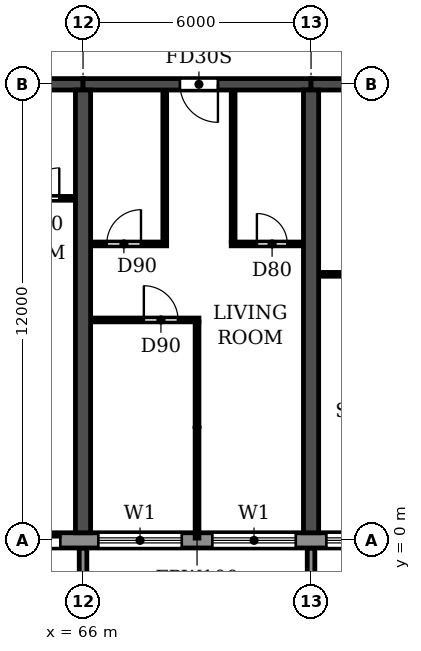
"""IFC4 building model, lengths in metres.
Left out: names, types, materials, properties, quantities, classifications, styles, units other than length and angle.
Written with IfcOpenShell. Run it as: python <this file> out.ifc"""

import sys

from ifc_helpers import new_model, si_unit, direction, frame, frame_2d, origin, place, context, subcontext, project, spatial, polyline, rectangle, outline, extrude, source, transform, mapped, element, fill, save


model = new_model("IFC4")
c1 = context("Model", 3, precision=1e-05, world=origin(), true_north=direction((0.0, 1.0)))
c2 = subcontext(c1, "Body", "Model", "MODEL_VIEW")
j1 = project(units=[si_unit("LENGTHUNIT", "METRE"), si_unit("PLANEANGLEUNIT", "RADIAN")], contexts=[c1])
p1 = place(None, origin())
s1 = spatial("IfcSite", under=j1, at=p1, CompositionType="ELEMENT")
p2 = place(p1, origin())
s2 = spatial("IfcBuilding", under=s1, at=p2, CompositionType="ELEMENT")
p3 = place(p2, frame((0.0, 0.0, 33.3)))
s3 = spatial("IfcBuildingStorey", under=s2, at=p3, CompositionType="ELEMENT", Elevation=33.3)
for number, where, z_axis, x_axis in (
    (1, (66.0, 0.2, 0.0), (0.0, 0.0, 1.0), (0.0, 1.0, 0.0)),
    (2, (72.0, 0.2, 0.0), (0.0, 0.0, 1.0), (0.0, 1.0, 0.0)),
):
    element("IfcWall", number, at=place(p3, frame(where, z_axis=z_axis, x_axis=x_axis)), inside=s3, PredefinedType="SHEAR", context=c2, shape_type="SweptSolid", body=[
        extrude(rectangle(XDim=11.65, YDim=0.4, at=frame_2d((5.825, 0.0))), origin(), (0.0, 0.0, 1.0), 3.05),
    ])
p4 = place(p3, frame((60.0, 12.0, 0.0), z_axis=(0.0, 0.0, 1.0), x_axis=(1.0, 0.0, 0.0)))
e3 = element("IfcWall", 3, at=p4, inside=s3, PredefinedType="SHEAR", context=c2, shape_type="SweptSolid", body=[
    extrude(rectangle(XDim=6.0, YDim=0.3, at=frame_2d((3.0, 0.0))), origin(), (0.0, 0.0, 1.0), 2.45),
])
p5 = place(p4, frame((2.55, 0.0, 0.0)))
e4 = element("IfcOpeningElement", 4, at=p5, cuts=e3, PredefinedType="OPENING", context=c2, shape_type="SweptSolid", body=[
    extrude(rectangle(XDim=1.0, YDim=2.1, at=frame_2d((0.5, 1.05))), frame((0.0, 0.16, 0.0), z_axis=(0.0, -1.0, 0.0), x_axis=(1.0, 0.0, 0.0)), (0.0, 0.0, 1.0), 0.32),
])
p6 = place(p3, frame((66.0, 12.0, 0.0), z_axis=(0.0, 0.0, 1.0), x_axis=(1.0, 0.0, 0.0)))
e5 = element("IfcWall", 5, at=p6, inside=s3, PredefinedType="SHEAR", context=c2, shape_type="SweptSolid", body=[
    extrude(rectangle(XDim=6.0, YDim=0.3, at=frame_2d((3.0, 0.0))), origin(), (0.0, 0.0, 1.0), 2.45),
])
p7 = place(p6, frame((2.55, 0.0, 0.0)))
e6 = element("IfcOpeningElement", 6, at=p7, cuts=e5, PredefinedType="OPENING", context=c2, shape_type="SweptSolid", body=[
    extrude(rectangle(XDim=1.0, YDim=2.1, at=frame_2d((0.5, 1.05))), frame((0.0, 0.16, 0.0), z_axis=(0.0, -1.0, 0.0), x_axis=(1.0, 0.0, 0.0)), (0.0, 0.0, 1.0), 0.32),
])
p8 = place(p3, frame((72.0, 12.0, 0.0), z_axis=(0.0, 0.0, 1.0), x_axis=(1.0, 0.0, 0.0)))
e7 = element("IfcWall", 7, at=p8, inside=s3, PredefinedType="SHEAR", context=c2, shape_type="SweptSolid", body=[
    extrude(rectangle(XDim=6.0, YDim=0.3, at=frame_2d((3.0, 0.0))), origin(), (0.0, 0.0, 1.0), 2.45),
])
p9 = place(p8, frame((2.45, 0.0, 0.0)))
e8 = element("IfcOpeningElement", 8, at=p9, cuts=e7, PredefinedType="OPENING", context=c2, shape_type="SweptSolid", body=[
    extrude(rectangle(XDim=1.0, YDim=2.1, at=frame_2d((0.5, 1.05))), frame((0.0, 0.16, 0.0), z_axis=(0.0, -1.0, 0.0), x_axis=(1.0, 0.0, 0.0)), (0.0, 0.0, 1.0), 0.32),
])
p10 = place(p3, frame((4.683, 0.0, 0.0), z_axis=(0.0, 0.0, 1.0), x_axis=(1.0, 0.0, 0.0)))
e9 = element("IfcWall", 9, at=p10, inside=s3, PredefinedType="STANDARD", context=c2, shape_type="SweptSolid", body=[
    extrude(rectangle(XDim=92.634, YDim=0.4, at=frame_2d((46.317, 0.0))), origin(), (0.0, 0.0, 1.0), 3.05),
])
p11 = place(p10, frame((1.717, 0.0, 0.9)))
e10 = element("IfcOpeningElement", 10, at=p11, cuts=e9, PredefinedType="OPENING", context=c2, shape_type="SweptSolid", body=[
    extrude(rectangle(XDim=2.2, YDim=1.5, at=frame_2d((1.1, 0.75))), frame((0.0, 0.21, 0.0), z_axis=(0.0, -1.0, 0.0), x_axis=(1.0, 0.0, 0.0)), (0.0, 0.0, 1.0), 0.42),
])
p12 = place(p10, frame((4.717, 0.0, 0.9)))
e11 = element("IfcOpeningElement", 11, at=p12, cuts=e9, PredefinedType="OPENING", context=c2, shape_type="SweptSolid", body=[
    extrude(rectangle(XDim=2.2, YDim=1.5, at=frame_2d((1.1, 0.75))), frame((0.0, 0.21, 0.0), z_axis=(0.0, -1.0, 0.0), x_axis=(1.0, 0.0, 0.0)), (0.0, 0.0, 1.0), 0.42),
])
p13 = place(p10, frame((7.917, 0.0, 0.0)))
e12 = element("IfcOpeningElement", 12, at=p13, cuts=e9, PredefinedType="OPENING", context=c2, shape_type="SweptSolid", body=[
    extrude(rectangle(XDim=1.8, YDim=2.4, at=frame_2d((0.9, 1.2))), frame((0.0, 0.21, 0.0), z_axis=(0.0, -1.0, 0.0), x_axis=(1.0, 0.0, 0.0)), (0.0, 0.0, 1.0), 0.42),
])
p14 = place(p10, frame((10.717, 0.0, 0.9)))
e13 = element("IfcOpeningElement", 13, at=p14, cuts=e9, PredefinedType="OPENING", context=c2, shape_type="SweptSolid", body=[
    extrude(rectangle(XDim=2.2, YDim=1.5, at=frame_2d((1.1, 0.75))), frame((0.0, 0.21, 0.0), z_axis=(0.0, -1.0, 0.0), x_axis=(1.0, 0.0, 0.0)), (0.0, 0.0, 1.0), 0.42),
])
p15 = place(p10, frame((13.717, 0.0, 0.9)))
e14 = element("IfcOpeningElement", 14, at=p15, cuts=e9, PredefinedType="OPENING", context=c2, shape_type="SweptSolid", body=[
    extrude(rectangle(XDim=2.2, YDim=1.5, at=frame_2d((1.1, 0.75))), frame((0.0, 0.21, 0.0), z_axis=(0.0, -1.0, 0.0), x_axis=(1.0, 0.0, 0.0)), (0.0, 0.0, 1.0), 0.42),
])
p16 = place(p10, frame((16.717, 0.0, 0.9)))
e15 = element("IfcOpeningElement", 15, at=p16, cuts=e9, PredefinedType="OPENING", context=c2, shape_type="SweptSolid", body=[
    extrude(rectangle(XDim=2.2, YDim=1.5, at=frame_2d((1.1, 0.75))), frame((0.0, 0.21, 0.0), z_axis=(0.0, -1.0, 0.0), x_axis=(1.0, 0.0, 0.0)), (0.0, 0.0, 1.0), 0.42),
])
p17 = place(p10, frame((19.717, 0.0, 0.9)))
e16 = element("IfcOpeningElement", 16, at=p17, cuts=e9, PredefinedType="OPENING", context=c2, shape_type="SweptSolid", body=[
    extrude(rectangle(XDim=2.2, YDim=1.5, at=frame_2d((1.1, 0.75))), frame((0.0, 0.21, 0.0), z_axis=(0.0, -1.0, 0.0), x_axis=(1.0, 0.0, 0.0)), (0.0, 0.0, 1.0), 0.42),
])
p18 = place(p10, frame((22.917, 0.0, 0.0)))
e17 = element("IfcOpeningElement", 17, at=p18, cuts=e9, PredefinedType="OPENING", context=c2, shape_type="SweptSolid", body=[
    extrude(rectangle(XDim=1.8, YDim=2.4, at=frame_2d((0.9, 1.2))), frame((0.0, 0.21, 0.0), z_axis=(0.0, -1.0, 0.0), x_axis=(1.0, 0.0, 0.0)), (0.0, 0.0, 1.0), 0.42),
])
p19 = place(p10, frame((25.717, 0.0, 0.9)))
e18 = element("IfcOpeningElement", 18, at=p19, cuts=e9, PredefinedType="OPENING", context=c2, shape_type="SweptSolid", body=[
    extrude(rectangle(XDim=2.2, YDim=1.5, at=frame_2d((1.1, 0.75))), frame((0.0, 0.21, 0.0), z_axis=(0.0, -1.0, 0.0), x_axis=(1.0, 0.0, 0.0)), (0.0, 0.0, 1.0), 0.42),
])
p20 = place(p10, frame((28.717, 0.0, 0.9)))
e19 = element("IfcOpeningElement", 19, at=p20, cuts=e9, PredefinedType="OPENING", context=c2, shape_type="SweptSolid", body=[
    extrude(rectangle(XDim=2.2, YDim=1.5, at=frame_2d((1.1, 0.75))), frame((0.0, 0.21, 0.0), z_axis=(0.0, -1.0, 0.0), x_axis=(1.0, 0.0, 0.0)), (0.0, 0.0, 1.0), 0.42),
])
p21 = place(p10, frame((31.717, 0.0, 0.9)))
e20 = element("IfcOpeningElement", 20, at=p21, cuts=e9, PredefinedType="OPENING", context=c2, shape_type="SweptSolid", body=[
    extrude(rectangle(XDim=2.2, YDim=1.5, at=frame_2d((1.1, 0.75))), frame((0.0, 0.21, 0.0), z_axis=(0.0, -1.0, 0.0), x_axis=(1.0, 0.0, 0.0)), (0.0, 0.0, 1.0), 0.42),
])
p22 = place(p10, frame((34.717, 0.0, 0.9)))
e21 = element("IfcOpeningElement", 21, at=p22, cuts=e9, PredefinedType="OPENING", context=c2, shape_type="SweptSolid", body=[
    extrude(rectangle(XDim=2.2, YDim=1.5, at=frame_2d((1.1, 0.75))), frame((0.0, 0.21, 0.0), z_axis=(0.0, -1.0, 0.0), x_axis=(1.0, 0.0, 0.0)), (0.0, 0.0, 1.0), 0.42),
])
p23 = place(p10, frame((37.717, 0.0, 0.9)))
e22 = element("IfcOpeningElement", 22, at=p23, cuts=e9, PredefinedType="OPENING", context=c2, shape_type="SweptSolid", body=[
    extrude(rectangle(XDim=2.2, YDim=1.5, at=frame_2d((1.1, 0.75))), frame((0.0, 0.21, 0.0), z_axis=(0.0, -1.0, 0.0), x_axis=(1.0, 0.0, 0.0)), (0.0, 0.0, 1.0), 0.42),
])
p24 = place(p10, frame((40.717, 0.0, 0.9)))
e23 = element("IfcOpeningElement", 23, at=p24, cuts=e9, PredefinedType="OPENING", context=c2, shape_type="SweptSolid", body=[
    extrude(rectangle(XDim=2.2, YDim=1.5, at=frame_2d((1.1, 0.75))), frame((0.0, 0.21, 0.0), z_axis=(0.0, -1.0, 0.0), x_axis=(1.0, 0.0, 0.0)), (0.0, 0.0, 1.0), 0.42),
])
p25 = place(p10, frame((43.717, 0.0, 0.9)))
e24 = element("IfcOpeningElement", 24, at=p25, cuts=e9, PredefinedType="OPENING", context=c2, shape_type="SweptSolid", body=[
    extrude(rectangle(XDim=2.2, YDim=1.5, at=frame_2d((1.1, 0.75))), frame((0.0, 0.21, 0.0), z_axis=(0.0, -1.0, 0.0), x_axis=(1.0, 0.0, 0.0)), (0.0, 0.0, 1.0), 0.42),
])
p26 = place(p10, frame((46.917, 0.0, 0.0)))
e25 = element("IfcOpeningElement", 25, at=p26, cuts=e9, PredefinedType="OPENING", context=c2, shape_type="SweptSolid", body=[
    extrude(rectangle(XDim=1.8, YDim=2.4, at=frame_2d((0.9, 1.2))), frame((0.0, 0.21, 0.0), z_axis=(0.0, -1.0, 0.0), x_axis=(1.0, 0.0, 0.0)), (0.0, 0.0, 1.0), 0.42),
])
p27 = place(p10, frame((49.717, 0.0, 0.9)))
e26 = element("IfcOpeningElement", 26, at=p27, cuts=e9, PredefinedType="OPENING", context=c2, shape_type="SweptSolid", body=[
    extrude(rectangle(XDim=2.2, YDim=1.5, at=frame_2d((1.1, 0.75))), frame((0.0, 0.21, 0.0), z_axis=(0.0, -1.0, 0.0), x_axis=(1.0, 0.0, 0.0)), (0.0, 0.0, 1.0), 0.42),
])
p28 = place(p10, frame((52.717, 0.0, 0.9)))
e27 = element("IfcOpeningElement", 27, at=p28, cuts=e9, PredefinedType="OPENING", context=c2, shape_type="SweptSolid", body=[
    extrude(rectangle(XDim=2.2, YDim=1.5, at=frame_2d((1.1, 0.75))), frame((0.0, 0.21, 0.0), z_axis=(0.0, -1.0, 0.0), x_axis=(1.0, 0.0, 0.0)), (0.0, 0.0, 1.0), 0.42),
])
p29 = place(p10, frame((55.717, 0.0, 0.9)))
e28 = element("IfcOpeningElement", 28, at=p29, cuts=e9, PredefinedType="OPENING", context=c2, shape_type="SweptSolid", body=[
    extrude(rectangle(XDim=2.2, YDim=1.5, at=frame_2d((1.1, 0.75))), frame((0.0, 0.21, 0.0), z_axis=(0.0, -1.0, 0.0), x_axis=(1.0, 0.0, 0.0)), (0.0, 0.0, 1.0), 0.42),
])
p30 = place(p10, frame((58.917, 0.0, 0.0)))
e29 = element("IfcOpeningElement", 29, at=p30, cuts=e9, PredefinedType="OPENING", context=c2, shape_type="SweptSolid", body=[
    extrude(rectangle(XDim=1.8, YDim=2.4, at=frame_2d((0.9, 1.2))), frame((0.0, 0.21, 0.0), z_axis=(0.0, -1.0, 0.0), x_axis=(1.0, 0.0, 0.0)), (0.0, 0.0, 1.0), 0.42),
])
p31 = place(p10, frame((61.717, 0.0, 0.9)))
e30 = element("IfcOpeningElement", 30, at=p31, cuts=e9, PredefinedType="OPENING", context=c2, shape_type="SweptSolid", body=[
    extrude(rectangle(XDim=2.2, YDim=1.5, at=frame_2d((1.1, 0.75))), frame((0.0, 0.21, 0.0), z_axis=(0.0, -1.0, 0.0), x_axis=(1.0, 0.0, 0.0)), (0.0, 0.0, 1.0), 0.42),
])
p32 = place(p10, frame((64.717, 0.0, 0.9)))
e31 = element("IfcOpeningElement", 31, at=p32, cuts=e9, PredefinedType="OPENING", context=c2, shape_type="SweptSolid", body=[
    extrude(rectangle(XDim=2.2, YDim=1.5, at=frame_2d((1.1, 0.75))), frame((0.0, 0.21, 0.0), z_axis=(0.0, -1.0, 0.0), x_axis=(1.0, 0.0, 0.0)), (0.0, 0.0, 1.0), 0.42),
])
p33 = place(p10, frame((67.717, 0.0, 0.9)))
e32 = element("IfcOpeningElement", 32, at=p33, cuts=e9, PredefinedType="OPENING", context=c2, shape_type="SweptSolid", body=[
    extrude(rectangle(XDim=2.2, YDim=1.5, at=frame_2d((1.1, 0.75))), frame((0.0, 0.21, 0.0), z_axis=(0.0, -1.0, 0.0), x_axis=(1.0, 0.0, 0.0)), (0.0, 0.0, 1.0), 0.42),
])
p34 = place(p10, frame((70.917, 0.0, 0.0)))
e33 = element("IfcOpeningElement", 33, at=p34, cuts=e9, PredefinedType="OPENING", context=c2, shape_type="SweptSolid", body=[
    extrude(rectangle(XDim=1.8, YDim=2.4, at=frame_2d((0.9, 1.2))), frame((0.0, 0.21, 0.0), z_axis=(0.0, -1.0, 0.0), x_axis=(1.0, 0.0, 0.0)), (0.0, 0.0, 1.0), 0.42),
])
p35 = place(p10, frame((73.717, 0.0, 0.9)))
e34 = element("IfcOpeningElement", 34, at=p35, cuts=e9, PredefinedType="OPENING", context=c2, shape_type="SweptSolid", body=[
    extrude(rectangle(XDim=2.2, YDim=1.5, at=frame_2d((1.1, 0.75))), frame((0.0, 0.21, 0.0), z_axis=(0.0, -1.0, 0.0), x_axis=(1.0, 0.0, 0.0)), (0.0, 0.0, 1.0), 0.42),
])
p36 = place(p10, frame((76.717, 0.0, 0.9)))
e35 = element("IfcOpeningElement", 35, at=p36, cuts=e9, PredefinedType="OPENING", context=c2, shape_type="SweptSolid", body=[
    extrude(rectangle(XDim=2.2, YDim=1.5, at=frame_2d((1.1, 0.75))), frame((0.0, 0.21, 0.0), z_axis=(0.0, -1.0, 0.0), x_axis=(1.0, 0.0, 0.0)), (0.0, 0.0, 1.0), 0.42),
])
p37 = place(p10, frame((79.717, 0.0, 0.9)))
e36 = element("IfcOpeningElement", 36, at=p37, cuts=e9, PredefinedType="OPENING", context=c2, shape_type="SweptSolid", body=[
    extrude(rectangle(XDim=2.2, YDim=1.5, at=frame_2d((1.1, 0.75))), frame((0.0, 0.21, 0.0), z_axis=(0.0, -1.0, 0.0), x_axis=(1.0, 0.0, 0.0)), (0.0, 0.0, 1.0), 0.42),
])
p38 = place(p10, frame((82.717, 0.0, 0.9)))
e37 = element("IfcOpeningElement", 37, at=p38, cuts=e9, PredefinedType="OPENING", context=c2, shape_type="SweptSolid", body=[
    extrude(rectangle(XDim=2.2, YDim=1.5, at=frame_2d((1.1, 0.75))), frame((0.0, 0.21, 0.0), z_axis=(0.0, -1.0, 0.0), x_axis=(1.0, 0.0, 0.0)), (0.0, 0.0, 1.0), 0.42),
])
p39 = place(p10, frame((85.717, 0.0, 0.9)))
e38 = element("IfcOpeningElement", 38, at=p39, cuts=e9, PredefinedType="OPENING", context=c2, shape_type="SweptSolid", body=[
    extrude(rectangle(XDim=2.2, YDim=1.5, at=frame_2d((1.1, 0.75))), frame((0.0, 0.21, 0.0), z_axis=(0.0, -1.0, 0.0), x_axis=(1.0, 0.0, 0.0)), (0.0, 0.0, 1.0), 0.42),
])
p40 = place(p10, frame((88.717, 0.0, 0.9)))
e39 = element("IfcOpeningElement", 39, at=p40, cuts=e9, PredefinedType="OPENING", context=c2, shape_type="SweptSolid", body=[
    extrude(rectangle(XDim=2.2, YDim=1.5, at=frame_2d((1.1, 0.75))), frame((0.0, 0.21, 0.0), z_axis=(0.0, -1.0, 0.0), x_axis=(1.0, 0.0, 0.0)), (0.0, 0.0, 1.0), 0.42),
])
m1 = source(origin(), c2, "Body", "SweptSolid", [
    extrude(outline(polyline([(0.0, 0.0), (0.2, 0.0), (0.2, 1.65), (0.0, 1.65), (0.0, 0.0)])), origin(), (0.0, 0.0, 1.0), 3.1),
])
for number, where in (
    (40, (65.9, -1.85, 0.0)),
    (41, (71.9, -1.85, 0.0)),
):
    element("IfcWall", number, at=place(p3, frame(where)), inside=s3, PredefinedType="STANDARD", context=c2, shape_type="MappedRepresentation", body=[
        mapped(m1, transform((0.0, 0.0, 0.0))),
    ])
p41 = place(p3, frame((66.21, 5.8, 0.0), z_axis=(0.0, 0.0, 1.0), x_axis=(1.0, 0.0, 0.0)))
e42 = element("IfcWall", 42, at=p41, inside=s3, PredefinedType="PARTITIONING", context=c2, shape_type="SweptSolid", body=[
    extrude(rectangle(XDim=2.84, YDim=0.1, at=frame_2d((1.42, 0.0))), origin(), (0.0, 0.0, 1.0), 3.05),
])
p42 = place(p41, frame((1.39, 0.0, 0.0)))
e43 = element("IfcOpeningElement", 43, at=p42, cuts=e42, PredefinedType="OPENING", context=c2, shape_type="SweptSolid", body=[
    extrude(rectangle(XDim=0.9, YDim=2.1, at=frame_2d((0.45, 1.05))), frame((0.0, 0.06, 0.0), z_axis=(0.0, -1.0, 0.0), x_axis=(1.0, 0.0, 0.0)), (0.0, 0.0, 1.0), 0.12),
])
p43 = place(p3, frame((72.21, 7.0, 0.0), z_axis=(0.0, 0.0, 1.0), x_axis=(1.0, 0.0, 0.0)))
e44 = element("IfcWall", 44, at=p43, inside=s3, PredefinedType="PARTITIONING", context=c2, shape_type="SweptSolid", body=[
    extrude(rectangle(XDim=1.89, YDim=0.1, at=frame_2d((0.945, 0.0))), origin(), (0.0, 0.0, 1.0), 3.05),
])
p44 = place(p3, frame((66.21, 7.8, 0.0), z_axis=(0.0, 0.0, 1.0), x_axis=(1.0, 0.0, 0.0)))
e45 = element("IfcWall", 45, at=p44, inside=s3, PredefinedType="PARTITIONING", context=c2, shape_type="SweptSolid", body=[
    extrude(rectangle(XDim=1.99, YDim=0.1, at=frame_2d((0.995, 0.0))), origin(), (0.0, 0.0, 1.0), 3.05),
])
p45 = place(p44, frame((0.415, 0.0, 0.0)))
e46 = element("IfcOpeningElement", 46, at=p45, cuts=e45, PredefinedType="OPENING", context=c2, shape_type="SweptSolid", body=[
    extrude(rectangle(XDim=0.9, YDim=2.1, at=frame_2d((0.45, 1.05))), frame((0.0, 0.06, 0.0), z_axis=(0.0, -1.0, 0.0), x_axis=(1.0, 0.0, 0.0)), (0.0, 0.0, 1.0), 0.12),
])
p46 = place(p3, frame((69.9, 7.8, 0.0), z_axis=(0.0, 0.0, 1.0), x_axis=(1.0, 0.0, 0.0)))
e47 = element("IfcWall", 47, at=p46, inside=s3, PredefinedType="PARTITIONING", context=c2, shape_type="SweptSolid", body=[
    extrude(rectangle(XDim=1.89, YDim=0.1, at=frame_2d((0.945, 0.0))), origin(), (0.0, 0.0, 1.0), 3.05),
])
p47 = place(p46, frame((0.675, 0.0, 0.0)))
e48 = element("IfcOpeningElement", 48, at=p47, cuts=e47, PredefinedType="OPENING", context=c2, shape_type="SweptSolid", body=[
    extrude(rectangle(XDim=0.8, YDim=2.1, at=frame_2d((0.4, 1.05))), frame((0.0, 0.06, 0.0), z_axis=(0.0, -1.0, 0.0), x_axis=(1.0, 0.0, 0.0)), (0.0, 0.0, 1.0), 0.12),
])
p48 = place(p3, frame((63.9, 9.0, 0.0), z_axis=(0.0, 0.0, 1.0), x_axis=(1.0, 0.0, 0.0)))
e49 = element("IfcWall", 49, at=p48, inside=s3, PredefinedType="PARTITIONING", context=c2, shape_type="SweptSolid", body=[
    extrude(rectangle(XDim=1.89, YDim=0.1, at=frame_2d((0.945, 0.0))), origin(), (0.0, 0.0, 1.0), 3.05),
])
p49 = place(p48, frame((0.675, 0.0, 0.0)))
e50 = element("IfcOpeningElement", 50, at=p49, cuts=e49, PredefinedType="OPENING", context=c2, shape_type="SweptSolid", body=[
    extrude(rectangle(XDim=0.8, YDim=2.1, at=frame_2d((0.4, 1.05))), frame((0.0, 0.06, 0.0), z_axis=(0.0, -1.0, 0.0), x_axis=(1.0, 0.0, 0.0)), (0.0, 0.0, 1.0), 0.12),
])
p50 = place(p3, frame((68.15, 7.85, 0.0), z_axis=(0.0, 0.0, 1.0), x_axis=(0.0, 1.0, 0.0)))
e51 = element("IfcWall", 51, at=p50, inside=s3, PredefinedType="PARTITIONING", context=c2, shape_type="SweptSolid", body=[
    extrude(rectangle(XDim=3.99, YDim=0.1, at=frame_2d((1.995, 0.0))), origin(), (0.0, 0.0, 1.0), 3.05),
])
p51 = place(p3, frame((69.0, 0.06, 0.0), z_axis=(0.0, 0.0, 1.0), x_axis=(0.0, 1.0, 0.0)))
e52 = element("IfcWall", 52, at=p51, inside=s3, PredefinedType="PARTITIONING", context=c2, shape_type="SweptSolid", body=[
    extrude(rectangle(XDim=5.69, YDim=0.1, at=frame_2d((2.845, 0.0))), origin(), (0.0, 0.0, 1.0), 3.05),
])
p52 = place(p3, frame((69.95, 7.85, 0.0), z_axis=(0.0, 0.0, 1.0), x_axis=(0.0, 1.0, 0.0)))
e53 = element("IfcWall", 53, at=p52, inside=s3, PredefinedType="PARTITIONING", context=c2, shape_type="SweptSolid", body=[
    extrude(rectangle(XDim=3.99, YDim=0.1, at=frame_2d((1.995, 0.0))), origin(), (0.0, 0.0, 1.0), 3.05),
])
p53 = place(p30, origin())
e54 = element("IfcDoor", 54, at=p53, inside=s3, OperationType="DOUBLE_DOOR_SLIDING", PredefinedType="DOOR", context=c2, shape_type="SweptSolid", body=[
    extrude(rectangle(XDim=1.8, YDim=2.4, at=frame_2d((0.9, 1.2))), frame((0.0, 0.025, 0.0), z_axis=(0.0, -1.0, 0.0), x_axis=(1.0, 0.0, 0.0)), (0.0, 0.0, 1.0), 0.05),
])
fill(e29, e54)
p54 = place(p31, origin())
e55 = element("IfcWindow", 55, at=p54, inside=s3, PartitioningType="DOUBLE_PANEL_HORIZONTAL", PredefinedType="WINDOW", context=c2, shape_type="SweptSolid", body=[
    extrude(rectangle(XDim=2.2, YDim=1.5, at=frame_2d((1.1, 0.75))), frame((0.0, 0.03, 0.0), z_axis=(0.0, -1.0, 0.0), x_axis=(1.0, 0.0, 0.0)), (0.0, 0.0, 1.0), 0.06),
])
fill(e30, e55)
p55 = place(p32, origin())
e56 = element("IfcWindow", 56, at=p55, inside=s3, PartitioningType="DOUBLE_PANEL_HORIZONTAL", PredefinedType="WINDOW", context=c2, shape_type="SweptSolid", body=[
    extrude(rectangle(XDim=2.2, YDim=1.5, at=frame_2d((1.1, 0.75))), frame((0.0, 0.03, 0.0), z_axis=(0.0, -1.0, 0.0), x_axis=(1.0, 0.0, 0.0)), (0.0, 0.0, 1.0), 0.06),
])
fill(e31, e56)
p56 = place(p33, origin())
e57 = element("IfcWindow", 57, at=p56, inside=s3, PartitioningType="DOUBLE_PANEL_HORIZONTAL", PredefinedType="WINDOW", context=c2, shape_type="SweptSolid", body=[
    extrude(rectangle(XDim=2.2, YDim=1.5, at=frame_2d((1.1, 0.75))), frame((0.0, 0.03, 0.0), z_axis=(0.0, -1.0, 0.0), x_axis=(1.0, 0.0, 0.0)), (0.0, 0.0, 1.0), 0.06),
])
fill(e32, e57)
p57 = place(p49, origin())
e58 = element("IfcDoor", 58, at=p57, inside=s3, OperationType="SINGLE_SWING_RIGHT", PredefinedType="DOOR", context=c2, shape_type="SweptSolid", body=[
    extrude(rectangle(XDim=0.8, YDim=2.1, at=frame_2d((0.4, 1.05))), frame((0.0, 0.025, 0.0), z_axis=(0.0, -1.0, 0.0), x_axis=(1.0, 0.0, 0.0)), (0.0, 0.0, 1.0), 0.05),
])
fill(e50, e58)
p58 = place(p45, origin())
e59 = element("IfcDoor", 59, at=p58, inside=s3, OperationType="SINGLE_SWING_RIGHT", PredefinedType="DOOR", context=c2, shape_type="SweptSolid", body=[
    extrude(rectangle(XDim=0.9, YDim=2.1, at=frame_2d((0.45, 1.05))), frame((0.0, 0.025, 0.0), z_axis=(0.0, -1.0, 0.0), x_axis=(1.0, 0.0, 0.0)), (0.0, 0.0, 1.0), 0.05),
])
fill(e46, e59)
p59 = place(p42, origin())
e60 = element("IfcDoor", 60, at=p59, inside=s3, OperationType="SINGLE_SWING_LEFT", PredefinedType="DOOR", context=c2, shape_type="SweptSolid", body=[
    extrude(rectangle(XDim=0.9, YDim=2.1, at=frame_2d((0.45, 1.05))), frame((0.0, 0.025, 0.0), z_axis=(0.0, -1.0, 0.0), x_axis=(1.0, 0.0, 0.0)), (0.0, 0.0, 1.0), 0.05),
])
fill(e43, e60)
p60 = place(p7, frame((1.0, 0.0, 0.0), z_axis=(0.0, 0.0, 1.0), x_axis=(-1.0, 0.0, 0.0)))
e61 = element("IfcDoor", 61, at=p60, inside=s3, OperationType="SINGLE_SWING_LEFT", PredefinedType="DOOR", context=c2, shape_type="SweptSolid", body=[
    extrude(rectangle(XDim=1.0, YDim=2.1, at=frame_2d((0.5, 1.05))), frame((0.0, 0.025, 0.0), z_axis=(0.0, -1.0, 0.0), x_axis=(1.0, 0.0, 0.0)), (0.0, 0.0, 1.0), 0.05),
])
fill(e6, e61)
p61 = place(p47, origin())
e62 = element("IfcDoor", 62, at=p61, inside=s3, OperationType="SINGLE_SWING_LEFT", PredefinedType="DOOR", context=c2, shape_type="SweptSolid", body=[
    extrude(rectangle(XDim=0.8, YDim=2.1, at=frame_2d((0.4, 1.05))), frame((0.0, 0.025, 0.0), z_axis=(0.0, -1.0, 0.0), x_axis=(1.0, 0.0, 0.0)), (0.0, 0.0, 1.0), 0.05),
])
fill(e48, e62)
save(model, sys.argv[1])
